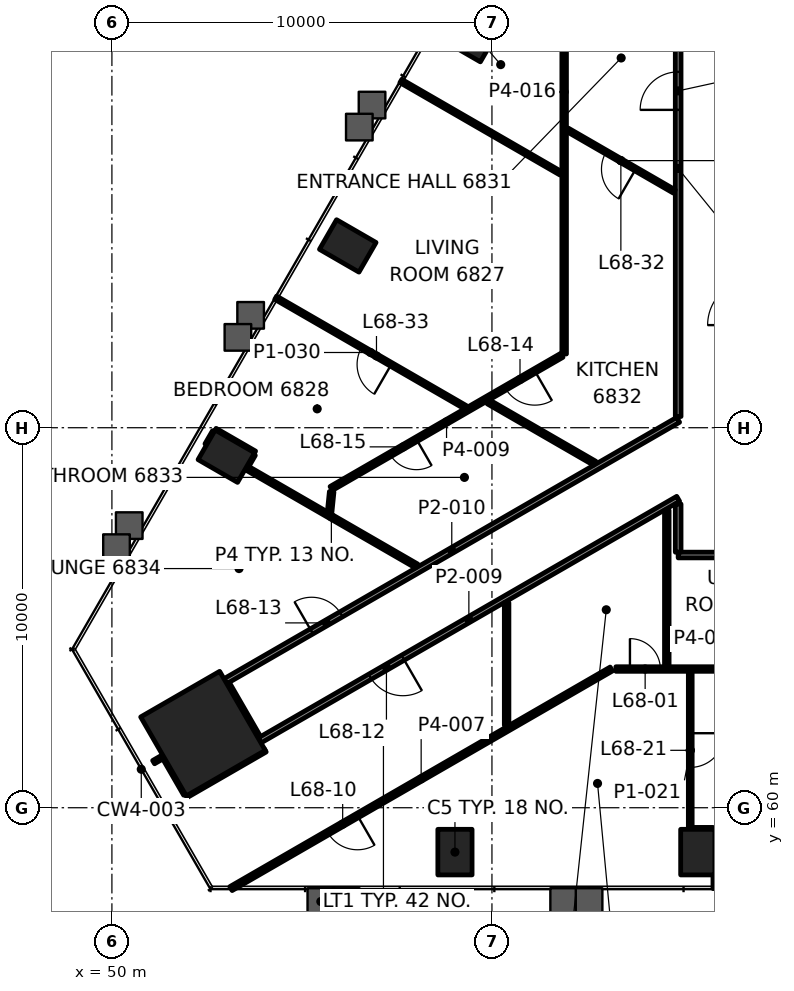
"""IFC4 building model, lengths in metres.
Left out: names, types, materials, properties, quantities, classifications, styles, units other than length and angle.
Written with IfcOpenShell. Run it as: python <this file> out.ifc"""

import sys

from ifc_helpers import new_model, si_unit, direction, frame, frame_2d, origin, origin_2d, place, context, subcontext, project, spatial, rectangle, hollow_rectangle, extrude, element, fill, save


model = new_model("IFC4")
c1 = context("Model", 3, precision=1e-05, world=origin(), true_north=direction((0.0, 1.0)))
c2 = subcontext(c1, "Body", "Model", "MODEL_VIEW")
j1 = project(units=[si_unit("LENGTHUNIT", "METRE"), si_unit("PLANEANGLEUNIT", "RADIAN")], contexts=[c1])
p1 = place(None, origin())
s1 = spatial("IfcSite", under=j1, at=p1, CompositionType="ELEMENT")
p2 = place(p1, origin())
s2 = spatial("IfcBuilding", under=s1, at=p2, CompositionType="ELEMENT")
p3 = place(p2, frame((0.0, 0.0, 284.6)))
s3 = spatial("IfcBuildingStorey", under=s2, at=p3, CompositionType="ELEMENT", Elevation=284.6)
p4 = place(p3, frame((52.396, 61.95, 0.0), z_axis=(0.0, 0.0, 1.0), x_axis=(0.5, -0.866025403784, 0.0)))
e1 = element("IfcColumn", 1, at=p4, inside=s3, PredefinedType="COLUMN", context=c2, shape_type="SweptSolid", body=[
    extrude(rectangle(XDim=2.4, YDim=2.4, at=origin_2d()), origin(), (0.0, 0.0, 1.0), 3.5),
])
for number, where, z_axis, x_axis in (
    (2, (59.027, 58.832, -0.0), (0.0, 0.0, 1.0), (1.0, 0.0, 0.0)),
    (3, (65.416, 58.832, -0.0), (0.0, 0.0, 1.0), (1.0, 0.0, 0.0)),
    (4, (59.401, 80.317, -0.0), (0.0, 0.0, 1.0), (-0.5, -0.866, 0.0)),
    (5, (56.206, 74.784, -0.0), (0.0, 0.0, 1.0), (-0.5, -0.866, 0.0)),
    (6, (53.011, 69.251, -0.0), (0.0, 0.0, 1.0), (-0.5, -0.866, 0.0)),
):
    element("IfcColumn", number, at=place(p3, frame(where, z_axis=z_axis, x_axis=x_axis)), inside=s3, PredefinedType="COLUMN", context=c2, shape_type="SweptSolid", body=[
        extrude(hollow_rectangle(XDim=0.9, YDim=1.2, WallThickness=0.06, at=origin_2d()), origin(), (0.0, 0.0, 1.0), 3.5),
    ])
p5 = place(p3, frame((65.268, 59.432, 0.0), z_axis=(0.0, 0.0, 1.0), x_axis=(1.0, 0.0, 0.0)))
e7 = element("IfcWall", 7, at=p5, inside=s3, PredefinedType="PARTITIONING", context=c2, shape_type="SweptSolid", body=[
    extrude(rectangle(XDim=0.548, YDim=0.1, at=frame_2d((0.274, 0.0))), origin(), (0.0, 0.0, 1.0), 2.7),
])
p6 = place(p3, frame((63.261, 63.65, 0.0), z_axis=(0.0, 0.0, 1.0), x_axis=(1.0, 0.0, 0.0)))
e8 = element("IfcWall", 8, at=p6, inside=s3, PredefinedType="PARTITIONING", context=c2, shape_type="SweptSolid", body=[
    extrude(rectangle(XDim=6.364, YDim=0.12, at=frame_2d((3.182, 0.0))), origin(), (0.0, 0.0, 1.0), 2.7),
])
p7 = place(p6, frame((0.37, 0.0, 0.0)))
e9 = element("IfcOpeningElement", 9, at=p7, cuts=e8, PredefinedType="OPENING", context=c2, shape_type="SweptSolid", body=[
    extrude(rectangle(XDim=0.8, YDim=2.1, at=frame_2d((0.4, 1.05))), frame((0.0, 0.07, 0.0), z_axis=(0.0, -1.0, 0.0), x_axis=(1.0, 0.0, 0.0)), (0.0, 0.0, 1.0), 0.14),
])
p8 = place(p6, frame((3.609, 0.0, 0.0)))
e10 = element("IfcOpeningElement", 10, at=p8, cuts=e8, PredefinedType="OPENING", context=c2, shape_type="SweptSolid", body=[
    extrude(rectangle(XDim=0.9, YDim=2.1, at=frame_2d((0.45, 1.05))), frame((0.0, 0.07, 0.0), z_axis=(0.0, -1.0, 0.0), x_axis=(1.0, 0.0, 0.0)), (0.0, 0.0, 1.0), 0.14),
])
p9 = place(p3, frame((85.1, 66.65, 0.0), z_axis=(0.0, 0.0, 1.0), x_axis=(-1.0, 0.0, 0.0)))
e11 = element("IfcWall", 11, at=p9, inside=s3, PredefinedType="PARTITIONING", context=c2, shape_type="SweptSolid", body=[
    extrude(rectangle(XDim=20.2, YDim=0.15, at=frame_2d((10.1, 0.0))), origin(), (0.0, 0.0, 1.0), 2.7),
])
p10 = place(p9, frame((6.405, 0.0, 0.0)))
e12 = element("IfcOpeningElement", 12, at=p10, cuts=e11, PredefinedType="OPENING", context=c2, shape_type="SweptSolid", body=[
    extrude(rectangle(XDim=1.0, YDim=2.1, at=frame_2d((0.5, 1.05))), frame((0.0, 0.085, 0.0), z_axis=(0.0, -1.0, 0.0), x_axis=(1.0, 0.0, 0.0)), (0.0, 0.0, 1.0), 0.17),
])
p11 = place(p9, frame((12.845, 0.0, 0.0)))
e13 = element("IfcOpeningElement", 13, at=p11, cuts=e11, PredefinedType="OPENING", context=c2, shape_type="SweptSolid", body=[
    extrude(rectangle(XDim=0.9, YDim=2.1, at=frame_2d((0.45, 1.05))), frame((0.0, 0.085, 0.0), z_axis=(0.0, -1.0, 0.0), x_axis=(1.0, 0.0, 0.0)), (0.0, 0.0, 1.0), 0.17),
])
p12 = place(p3, frame((63.141, 63.65, 0.0), z_axis=(0.0, 0.0, 1.0), x_axis=(-0.866023045711, -0.500004084281, 0.0)))
e14 = element("IfcWall", 14, at=p12, inside=s3, PredefinedType="PARTITIONING", context=c2, shape_type="SweptSolid", body=[
    extrude(rectangle(XDim=11.556, YDim=0.12, at=frame_2d((5.778, 0.0))), origin(), (0.0, 0.0, 1.0), 2.7),
])
p13 = place(p12, frame((7.713, 0.0, 0.0)))
e15 = element("IfcOpeningElement", 15, at=p13, cuts=e14, PredefinedType="OPENING", context=c2, shape_type="SweptSolid", body=[
    extrude(rectangle(XDim=0.9, YDim=2.1, at=frame_2d((0.45, 1.05))), frame((0.0, 0.07, 0.0), z_axis=(0.0, -1.0, 0.0), x_axis=(1.0, 0.0, 0.0)), (0.0, 0.0, 1.0), 0.14),
])
p14 = place(p3, frame((51.957, 60.311, 0.0), z_axis=(0.0, 0.0, 1.0), x_axis=(0.866036455013, 0.499980858223, 0.0)))
e16 = element("IfcWall", 16, at=p14, inside=s3, PredefinedType="PARTITIONING", context=c2, shape_type="SweptSolid", body=[
    extrude(rectangle(XDim=2.399, YDim=0.1, at=frame_2d((1.199, 0.0))), origin(), (0.0, 0.0, 1.0), 2.7),
])
p15 = place(p3, frame((64.9, 68.13, 0.0), z_axis=(0.0, 0.0, 1.0), x_axis=(-0.866023199005, -0.500003818771, 0.0)))
e17 = element("IfcWall", 17, at=p15, inside=s3, PredefinedType="PARTITIONING", context=c2, shape_type="SweptSolid", body=[
    extrude(rectangle(XDim=12.719, YDim=0.15, at=frame_2d((6.359, 0.0))), origin(), (0.0, 0.0, 1.0), 2.547),
])
p16 = place(p15, frame((8.364, 0.0, 0.0)))
e18 = element("IfcOpeningElement", 18, at=p16, cuts=e17, PredefinedType="OPENING", context=c2, shape_type="SweptSolid", body=[
    extrude(rectangle(XDim=1.0, YDim=2.1, at=frame_2d((0.5, 1.05))), frame((0.0, 0.085, 0.0), z_axis=(0.0, -1.0, 0.0), x_axis=(1.0, 0.0, 0.0)), (0.0, 0.0, 1.0), 0.17),
])
p17 = place(p3, frame((51.097, 61.2, 0.0), z_axis=(0.0, 0.0, 1.0), x_axis=(0.866006330792, 0.500033033937, 0.0)))
e19 = element("IfcWall", 19, at=p17, inside=s3, PredefinedType="PARTITIONING", context=c2, shape_type="SweptSolid", body=[
    extrude(rectangle(XDim=0.25, YDim=0.1, at=frame_2d((0.125, 0.0))), origin(), (0.0, 0.0, 1.0), 2.7),
])
p18 = place(p3, frame((52.986, 63.329, 0.0), z_axis=(0.0, 0.0, 1.0), x_axis=(0.866027482275, 0.499996399932, 0.0)))
e20 = element("IfcWall", 20, at=p18, inside=s3, PredefinedType="PARTITIONING", context=c2, shape_type="SweptSolid", body=[
    extrude(rectangle(XDim=13.757, YDim=0.15, at=frame_2d((6.879, 0.0))), origin(), (0.0, 0.0, 1.0), 2.7),
])
p19 = place(p18, frame((2.62, 0.0, 0.0)))
e21 = element("IfcOpeningElement", 21, at=p19, cuts=e20, PredefinedType="OPENING", context=c2, shape_type="SweptSolid", body=[
    extrude(rectangle(XDim=0.9, YDim=2.1, at=frame_2d((0.45, 1.05))), frame((0.0, 0.085, 0.0), z_axis=(0.0, -1.0, 0.0), x_axis=(1.0, 0.0, 0.0)), (0.0, 0.0, 1.0), 0.17),
])
p20 = place(p3, frame((61.84, 71.906, 0.0), z_axis=(0.0, 0.0, 1.0), x_axis=(-0.866015603583, -0.500016974063, 0.0)))
e22 = element("IfcWall", 22, at=p20, inside=s3, PredefinedType="PARTITIONING", context=c2, shape_type="SweptSolid", body=[
    extrude(rectangle(XDim=7.008, YDim=0.12, at=frame_2d((3.504, 0.0))), origin(), (0.0, 0.0, 1.0), 2.7),
])
p21 = place(p20, frame((0.822, 0.0, 0.0)))
e23 = element("IfcOpeningElement", 23, at=p21, cuts=e22, PredefinedType="OPENING", context=c2, shape_type="SweptSolid", body=[
    extrude(rectangle(XDim=0.9, YDim=2.1, at=frame_2d((0.45, 1.05))), frame((0.0, 0.07, 0.0), z_axis=(0.0, -1.0, 0.0), x_axis=(1.0, 0.0, 0.0)), (0.0, 0.0, 1.0), 0.14),
])
p22 = place(p20, frame((4.418, 0.0, 0.0)))
e24 = element("IfcOpeningElement", 24, at=p22, cuts=e22, PredefinedType="OPENING", context=c2, shape_type="SweptSolid", body=[
    extrude(rectangle(XDim=0.8, YDim=2.1, at=frame_2d((0.4, 1.05))), frame((0.0, 0.07, 0.0), z_axis=(0.0, -1.0, 0.0), x_axis=(1.0, 0.0, 0.0)), (0.0, 0.0, 1.0), 0.14),
])
p23 = place(p3, frame((53.561, 69.003, 0.0), z_axis=(0.0, 0.0, 1.0), x_axis=(0.500241622161, 0.865885858216, 0.0)))
e25 = element("IfcWall", 25, at=p23, inside=s3, PredefinedType="PARTITIONING", context=c2, shape_type="SweptSolid", body=[
    extrude(rectangle(XDim=0.339, YDim=0.1, at=frame_2d((0.169, 0.0))), origin(), (0.0, 0.0, 1.0), 2.7),
])
p24 = place(p3, frame((52.491, 69.551, 0.0), z_axis=(0.0, 0.0, 1.0), x_axis=(0.499951716245, 0.866053278629, 0.0)))
e26 = element("IfcWall", 26, at=p24, inside=s3, PredefinedType="PARTITIONING", context=c2, shape_type="SweptSolid", body=[
    extrude(rectangle(XDim=0.399, YDim=0.1, at=frame_2d((0.2, 0.0))), origin(), (0.0, 0.0, 1.0), 2.7),
])
p25 = place(p3, frame((55.729, 67.781, 0.0), z_axis=(0.0, 0.0, 1.0), x_axis=(0.099548724898, 0.995032688594, 0.0)))
e27 = element("IfcWall", 27, at=p25, inside=s3, PredefinedType="PARTITIONING", context=c2, shape_type="SweptSolid", body=[
    extrude(rectangle(XDim=0.537, YDim=0.12, at=frame_2d((0.269, 0.0))), origin(), (0.0, 0.0, 1.0), 2.7),
])
p26 = place(p3, frame((65.866, 57.872, 0.0), z_axis=(0.0, 0.0, 1.0), x_axis=(0.0, 1.0, 0.0)))
e28 = element("IfcWall", 28, at=p26, inside=s3, PredefinedType="PARTITIONING", context=c2, shape_type="SweptSolid", body=[
    extrude(rectangle(XDim=1.56, YDim=0.1, at=frame_2d((0.78, 0.0))), origin(), (0.0, 0.0, 1.0), 2.688),
])
p27 = place(p3, frame((65.218, 63.59, 0.0), z_axis=(0.0, 0.0, 1.0), x_axis=(0.0, -1.0, 0.0)))
e29 = element("IfcWall", 29, at=p27, inside=s3, PredefinedType="PARTITIONING", context=c2, shape_type="SweptSolid", body=[
    extrude(rectangle(XDim=4.158, YDim=0.1, at=frame_2d((2.079, 0.0))), origin(), (0.0, 0.0, 1.0), 2.7),
])
p28 = place(p27, frame((1.629, 0.0, 0.0)))
e30 = element("IfcOpeningElement", 30, at=p28, cuts=e29, PredefinedType="OPENING", context=c2, shape_type="SweptSolid", body=[
    extrude(rectangle(XDim=0.9, YDim=2.1, at=frame_2d((0.45, 1.05))), frame((0.0, 0.06, 0.0), z_axis=(0.0, -1.0, 0.0), x_axis=(1.0, 0.0, 0.0)), (0.0, 0.0, 1.0), 0.12),
])
p29 = place(p3, frame((64.9, 66.725, 0.0), z_axis=(0.0, 0.0, 1.0), x_axis=(0.0, 1.0, 0.0)))
e31 = element("IfcWall", 31, at=p29, inside=s3, PredefinedType="PARTITIONING", context=c2, shape_type="SweptSolid", body=[
    extrude(rectangle(XDim=1.268, YDim=0.15, at=frame_2d((0.634, 0.0))), origin(), (0.0, 0.0, 1.0), 2.547),
])
p30 = place(p3, frame((64.9, 70.295, 0.0), z_axis=(0.0, 0.0, 1.0), x_axis=(0.0, 1.0, 0.0)))
e32 = element("IfcWall", 32, at=p30, inside=s3, PredefinedType="PARTITIONING", context=c2, shape_type="SweptSolid", body=[
    extrude(rectangle(XDim=13.055, YDim=0.15, at=frame_2d((6.528, 0.0))), origin(), (0.0, 0.0, 1.0), 2.7),
])
p31 = place(p30, frame((8.07, 0.0, 0.0)))
e33 = element("IfcOpeningElement", 33, at=p31, cuts=e32, PredefinedType="OPENING", context=c2, shape_type="SweptSolid", body=[
    extrude(rectangle(XDim=1.0, YDim=2.1, at=frame_2d((0.5, 1.05))), frame((0.0, 0.085, 0.0), z_axis=(0.0, -1.0, 0.0), x_axis=(1.0, 0.0, 0.0)), (0.0, 0.0, 1.0), 0.17),
])
p32 = place(p3, frame((64.601, 63.71, 0.0), z_axis=(0.0, 0.0, 1.0), x_axis=(0.0, 1.0, 0.0)))
e34 = element("IfcWall", 34, at=p32, inside=s3, PredefinedType="PARTITIONING", context=c2, shape_type="SweptSolid", body=[
    extrude(rectangle(XDim=4.12, YDim=0.12, at=frame_2d((2.06, 0.0))), origin(), (0.0, 0.0, 1.0), 2.547),
])
p33 = place(p3, frame((61.9, 71.94, 0.0), z_axis=(0.0, 0.0, 1.0), x_axis=(0.0, 1.0, 0.0)))
e35 = element("IfcWall", 35, at=p33, inside=s3, PredefinedType="PARTITIONING", context=c2, shape_type="SweptSolid", body=[
    extrude(rectangle(XDim=13.792, YDim=0.12, at=frame_2d((6.896, 0.0))), origin(), (0.0, 0.0, 1.0), 2.688),
])
p34 = place(p33, frame((8.206, 0.0, 0.0)))
e36 = element("IfcOpeningElement", 36, at=p34, cuts=e35, PredefinedType="OPENING", context=c2, shape_type="SweptSolid", body=[
    extrude(rectangle(XDim=0.9, YDim=2.1, at=frame_2d((0.45, 1.05))), frame((0.0, 0.07, 0.0), z_axis=(0.0, -1.0, 0.0), x_axis=(1.0, 0.0, 0.0)), (0.0, 0.0, 1.0), 0.14),
])
p35 = place(p3, frame((60.386, 62.169, 0.0), z_axis=(0.0, 0.0, 1.0), x_axis=(0.0, 1.0, 0.0)))
e37 = element("IfcWall", 37, at=p35, inside=s3, PredefinedType="PARTITIONING", context=c2, shape_type="SweptSolid", body=[
    extrude(rectangle(XDim=3.228, YDim=0.12, at=frame_2d((1.614, 0.0))), origin(), (0.0, 0.0, 1.0), 2.547),
])
p36 = place(p3, frame((53.845, 61.84, 0.0), z_axis=(0.0, 0.0, 1.0), x_axis=(-0.499988108725, 0.866032269107, 0.0)))
e38 = element("IfcWall", 38, at=p36, inside=s3, PredefinedType="PARTITIONING", context=c2, shape_type="SweptSolid", body=[
    extrude(rectangle(XDim=1.644, YDim=0.15, at=frame_2d((0.822, 0.0))), origin(), (0.0, 0.0, 1.0), 2.547),
])
p37 = place(p3, frame((51.931, 60.354, 0.0), z_axis=(0.0, 0.0, 1.0), x_axis=(-0.499955427682, 0.866051136095, 0.0)))
e39 = element("IfcWall", 39, at=p37, inside=s3, PredefinedType="PARTITIONING", context=c2, shape_type="SweptSolid", body=[
    extrude(rectangle(XDim=1.149, YDim=0.1, at=frame_2d((0.574, 0.0))), origin(), (0.0, 0.0, 1.0), 2.7),
])
p38 = place(p3, frame((64.799, 76.217, 0.0), z_axis=(0.0, 0.0, 1.0), x_axis=(-0.866000336211, 0.500043415797, 0.0)))
e40 = element("IfcWall", 40, at=p38, inside=s3, PredefinedType="PARTITIONING", context=c2, shape_type="SweptSolid", body=[
    extrude(rectangle(XDim=3.248, YDim=0.1, at=frame_2d((1.624, 0.0))), origin(), (0.0, 0.0, 1.0), 2.7),
])
p39 = place(p38, frame((1.174, 0.0, 0.0)))
e41 = element("IfcOpeningElement", 41, at=p39, cuts=e40, PredefinedType="OPENING", context=c2, shape_type="SweptSolid", body=[
    extrude(rectangle(XDim=0.9, YDim=2.1, at=frame_2d((0.45, 1.05))), frame((0.0, 0.06, 0.0), z_axis=(0.0, -1.0, 0.0), x_axis=(1.0, 0.0, 0.0)), (0.0, 0.0, 1.0), 0.12),
])
p40 = place(p3, frame((61.814, 76.693, 0.0), z_axis=(0.0, 0.0, 1.0), x_axis=(-0.866028392017, 0.499994824194, 0.0)))
e42 = element("IfcWall", 42, at=p40, inside=s3, PredefinedType="PARTITIONING", context=c2, shape_type="SweptSolid", body=[
    extrude(rectangle(XDim=4.862, YDim=0.1, at=frame_2d((2.431, 0.0))), origin(), (0.0, 0.0, 1.0), 2.688),
])
p41 = place(p3, frame((62.702, 69.066, 0.0), z_axis=(0.0, 0.0, 1.0), x_axis=(-0.866033195618, 0.499986503906, 0.0)))
e43 = element("IfcWall", 43, at=p41, inside=s3, PredefinedType="PARTITIONING", context=c2, shape_type="SweptSolid", body=[
    extrude(rectangle(XDim=3.228, YDim=0.12, at=frame_2d((1.614, 0.0))), origin(), (0.0, 0.0, 1.0), 2.7),
])
p42 = place(p3, frame((59.301, 70.539, 0.0), z_axis=(0.0, 0.0, 1.0), x_axis=(-0.866021213215, 0.500007258209, 0.0)))
e44 = element("IfcWall", 44, at=p42, inside=s3, PredefinedType="PARTITIONING", context=c2, shape_type="SweptSolid", body=[
    extrude(rectangle(XDim=5.763, YDim=0.1, at=frame_2d((2.882, 0.0))), origin(), (0.0, 0.0, 1.0), 2.7),
])
p43 = place(p42, frame((2.252, 0.0, 0.0)))
e45 = element("IfcOpeningElement", 45, at=p43, cuts=e44, PredefinedType="OPENING", context=c2, shape_type="SweptSolid", body=[
    extrude(rectangle(XDim=0.9, YDim=2.1, at=frame_2d((0.45, 1.05))), frame((0.0, 0.06, 0.0), z_axis=(0.0, -1.0, 0.0), x_axis=(1.0, 0.0, 0.0)), (0.0, 0.0, 1.0), 0.12),
])
p44 = place(p3, frame((53.756, 69.341, 0.0), z_axis=(0.0, 0.0, 1.0), x_axis=(-0.866066905393, 0.499928110214, 0.0)))
e46 = element("IfcWall", 46, at=p44, inside=s3, PredefinedType="PARTITIONING", context=c2, shape_type="SweptSolid", body=[
    extrude(rectangle(XDim=1.199, YDim=0.1, at=frame_2d((0.6, 0.0))), origin(), (0.0, 0.0, 1.0), 2.7),
])
p45 = place(p3, frame((58.017, 66.361, 0.0), z_axis=(0.0, 0.0, 1.0), x_axis=(-0.866018392704, 0.500012143352, 0.0)))
e47 = element("IfcWall", 47, at=p45, inside=s3, PredefinedType="PARTITIONING", context=c2, shape_type="SweptSolid", body=[
    extrude(rectangle(XDim=5.179, YDim=0.12, at=frame_2d((2.59, 0.0))), origin(), (0.0, 0.0, 1.0), 2.7),
])
p46 = place(p7, origin())
e48 = element("IfcDoor", 48, at=p46, inside=s3, OperationType="SINGLE_SWING_RIGHT", PredefinedType="DOOR", context=c2, shape_type="SweptSolid", body=[
    extrude(rectangle(XDim=0.8, YDim=2.1, at=frame_2d((0.4, 1.05))), frame((0.0, 0.025, 0.0), z_axis=(0.0, -1.0, 0.0), x_axis=(1.0, 0.0, 0.0)), (0.0, 0.0, 1.0), 0.05),
])
fill(e9, e48)
p47 = place(p13, origin())
e49 = element("IfcDoor", 49, at=p47, inside=s3, OperationType="SINGLE_SWING_RIGHT", PredefinedType="DOOR", context=c2, shape_type="SweptSolid", body=[
    extrude(rectangle(XDim=0.9, YDim=2.1, at=frame_2d((0.45, 1.05))), frame((0.0, 0.025, 0.0), z_axis=(0.0, -1.0, 0.0), x_axis=(1.0, 0.0, 0.0)), (0.0, 0.0, 1.0), 0.05),
])
fill(e15, e49)
p48 = place(p16, origin())
e50 = element("IfcDoor", 50, at=p48, inside=s3, OperationType="SINGLE_SWING_LEFT", PredefinedType="DOOR", context=c2, shape_type="SweptSolid", body=[
    extrude(rectangle(XDim=1.0, YDim=2.1, at=frame_2d((0.5, 1.05))), frame((0.0, 0.025, 0.0), z_axis=(0.0, -1.0, 0.0), x_axis=(1.0, 0.0, 0.0)), (0.0, 0.0, 1.0), 0.05),
])
fill(e18, e50)
p49 = place(p19, origin())
e51 = element("IfcDoor", 51, at=p49, inside=s3, OperationType="SINGLE_SWING_LEFT", PredefinedType="DOOR", context=c2, shape_type="SweptSolid", body=[
    extrude(rectangle(XDim=0.9, YDim=2.1, at=frame_2d((0.45, 1.05))), frame((0.0, 0.025, 0.0), z_axis=(0.0, -1.0, 0.0), x_axis=(1.0, 0.0, 0.0)), (0.0, 0.0, 1.0), 0.05),
])
fill(e21, e51)
p50 = place(p21, origin())
e52 = element("IfcDoor", 52, at=p50, inside=s3, OperationType="SINGLE_SWING_LEFT", PredefinedType="DOOR", context=c2, shape_type="SweptSolid", body=[
    extrude(rectangle(XDim=0.9, YDim=2.1, at=frame_2d((0.45, 1.05))), frame((0.0, 0.025, 0.0), z_axis=(0.0, -1.0, 0.0), x_axis=(1.0, 0.0, 0.0)), (0.0, 0.0, 1.0), 0.05),
])
fill(e23, e52)
p51 = place(p22, origin())
e53 = element("IfcDoor", 53, at=p51, inside=s3, OperationType="SINGLE_SWING_LEFT", PredefinedType="DOOR", context=c2, shape_type="SweptSolid", body=[
    extrude(rectangle(XDim=0.8, YDim=2.1, at=frame_2d((0.4, 1.05))), frame((0.0, 0.025, 0.0), z_axis=(0.0, -1.0, 0.0), x_axis=(1.0, 0.0, 0.0)), (0.0, 0.0, 1.0), 0.05),
])
fill(e24, e53)
p52 = place(p28, origin())
e54 = element("IfcDoor", 54, at=p52, inside=s3, OperationType="SINGLE_SWING_RIGHT", PredefinedType="DOOR", context=c2, shape_type="SweptSolid", body=[
    extrude(rectangle(XDim=0.9, YDim=2.1, at=frame_2d((0.45, 1.05))), frame((0.0, 0.025, 0.0), z_axis=(0.0, -1.0, 0.0), x_axis=(1.0, 0.0, 0.0)), (0.0, 0.0, 1.0), 0.05),
])
fill(e30, e54)
p53 = place(p31, origin())
e55 = element("IfcDoor", 55, at=p53, inside=s3, OperationType="SINGLE_SWING_RIGHT", PredefinedType="DOOR", context=c2, shape_type="SweptSolid", body=[
    extrude(rectangle(XDim=1.0, YDim=2.1, at=frame_2d((0.5, 1.05))), frame((0.0, 0.025, 0.0), z_axis=(0.0, -1.0, 0.0), x_axis=(1.0, 0.0, 0.0)), (0.0, 0.0, 1.0), 0.05),
])
fill(e33, e55)
p54 = place(p39, origin())
e56 = element("IfcDoor", 56, at=p54, inside=s3, OperationType="SINGLE_SWING_LEFT", PredefinedType="DOOR", context=c2, shape_type="SweptSolid", body=[
    extrude(rectangle(XDim=0.9, YDim=2.1, at=frame_2d((0.45, 1.05))), frame((0.0, 0.025, 0.0), z_axis=(0.0, -1.0, 0.0), x_axis=(1.0, 0.0, 0.0)), (0.0, 0.0, 1.0), 0.05),
])
fill(e41, e56)
p55 = place(p43, origin())
e57 = element("IfcDoor", 57, at=p55, inside=s3, OperationType="SINGLE_SWING_LEFT", PredefinedType="DOOR", context=c2, shape_type="SweptSolid", body=[
    extrude(rectangle(XDim=0.9, YDim=2.1, at=frame_2d((0.45, 1.05))), frame((0.0, 0.025, 0.0), z_axis=(0.0, -1.0, 0.0), x_axis=(1.0, 0.0, 0.0)), (0.0, 0.0, 1.0), 0.05),
])
fill(e45, e57)
save(model, sys.argv[1])
